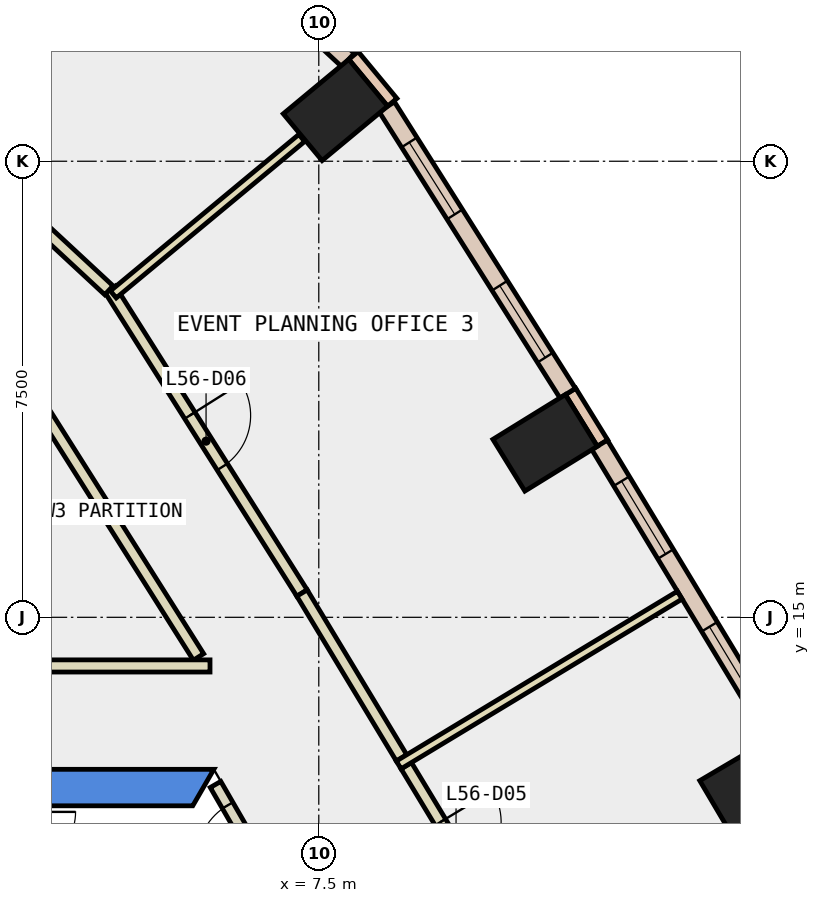
"""IFC4 building model, lengths in metres.
Left out: names, types, materials, properties, quantities, classifications, styles, units other than length and angle.
Written with IfcOpenShell. Run it as: python <this file> out.ifc"""

import sys

from ifc_helpers import new_model, si_unit, direction, frame, frame_2d, origin, origin_2d, place, context, subcontext, project, spatial, polyline, rectangle, outline, extrude, element, fill, save


model = new_model("IFC4")
c1 = context("Model", 3, precision=1e-05, world=origin(), true_north=direction((0.0, 1.0)))
c2 = subcontext(c1, "Body", "Model", "MODEL_VIEW")
j1 = project(units=[si_unit("LENGTHUNIT", "METRE"), si_unit("PLANEANGLEUNIT", "RADIAN")], contexts=[c1])
p1 = place(None, origin())
s1 = spatial("IfcSite", under=j1, at=p1, CompositionType="ELEMENT")
p2 = place(p1, origin())
s2 = spatial("IfcBuilding", under=s1, at=p2, CompositionType="ELEMENT")
p3 = place(p2, frame((0.0, 0.0, 248.6)))
s3 = spatial("IfcBuildingStorey", under=s2, at=p3, CompositionType="ELEMENT", Elevation=248.6)
for number, where, z_axis, x_axis in (
    (1, (14.623, 12.239, -0.34), (0.0, 0.0, 1.0), (-0.509, 0.861, 0.0)),
    (2, (11.222, 17.869, -0.34), (0.0, 0.0, 1.0), (-0.526, 0.851, 0.0)),
    (3, (7.774, 23.343, -0.34), (0.0, 0.0, 1.0), (-0.639, 0.769, 0.0)),
):
    element("IfcColumn", number, at=place(p3, frame(where, z_axis=z_axis, x_axis=x_axis)), inside=s3, PredefinedType="COLUMN", context=c2, shape_type="SweptSolid", body=[
        extrude(rectangle(XDim=1.0, YDim=1.4, at=origin_2d()), origin(), (0.0, 0.0, 1.0), 3.6),
    ])
p4 = place(p3, frame((0.0, 0.0, -0.34)))
e4 = element("IfcWall", 4, at=p4, inside=s3, PredefinedType="SHEAR", context=c2, shape_type="SweptSolid", body=[
    extrude(outline(polyline([(5.774, 12.5), (-5.774, 12.5), (-5.427, 11.9), (5.427, 11.9), (5.774, 12.5)])), origin(), (0.0, 0.0, 1.0), 3.6),
])
p5 = place(p3, frame((12.166, 17.864, 0.0), z_axis=(0.0, 0.0, 1.0), x_axis=(-0.525825307325, 0.850592585306, 0.0)))
e5 = element("IfcWall", 5, at=p5, inside=s3, PredefinedType="STANDARD", context=c2, shape_type="SweptSolid", body=[
    extrude(rectangle(XDim=1.0, YDim=0.2, at=frame_2d((0.5, 0.0))), origin(), (0.0, 0.0, 1.0), 3.26),
])
p6 = place(p3, frame((8.708, 23.469, 0.0), z_axis=(0.0, 0.0, 1.0), x_axis=(-0.637972365578, 0.770059257953, 0.0)))
e6 = element("IfcWall", 6, at=p6, inside=s3, PredefinedType="STANDARD", context=c2, shape_type="SweptSolid", body=[
    extrude(rectangle(XDim=1.0, YDim=0.2, at=frame_2d((0.5, 0.0))), origin(), (0.0, 0.0, 1.0), 3.26),
])
p7 = place(p3, frame((15.011, 13.048, 0.0), z_axis=(0.0, 0.0, 1.0), x_axis=(-0.517169592475, 0.855882943293, 0.0)))
e7 = element("IfcWall", 7, at=p7, inside=s3, PredefinedType="STANDARD", context=c2, shape_type="SweptSolid", body=[
    extrude(rectangle(XDim=5.594, YDim=0.3, at=frame_2d((2.797, 0.0))), origin(), (0.0, 0.0, 1.0), 3.26),
])
p8 = place(p7, frame((0.699, 0.0, 0.9)))
e8 = element("IfcOpeningElement", 8, at=p8, cuts=e7, PredefinedType="OPENING", context=c2, shape_type="SweptSolid", body=[
    extrude(rectangle(XDim=1.4, YDim=2.0, at=frame_2d((0.7, 1.0))), frame((0.0, 0.16, 0.0), z_axis=(0.0, -1.0, 0.0), x_axis=(1.0, 0.0, 0.0)), (0.0, 0.0, 1.0), 0.32),
])
p9 = place(p7, frame((3.496, 0.0, 0.9)))
e9 = element("IfcOpeningElement", 9, at=p9, cuts=e7, PredefinedType="OPENING", context=c2, shape_type="SweptSolid", body=[
    extrude(rectangle(XDim=1.4, YDim=2.0, at=frame_2d((0.7, 1.0))), frame((0.0, 0.16, 0.0), z_axis=(0.0, -1.0, 0.0), x_axis=(1.0, 0.0, 0.0)), (0.0, 0.0, 1.0), 0.32),
])
p10 = place(p3, frame((11.594, 18.685, 0.0), z_axis=(0.0, 0.0, 1.0), x_axis=(-0.534088597203, 0.845428512849, 0.0)))
e10 = element("IfcWall", 10, at=p10, inside=s3, PredefinedType="STANDARD", context=c2, shape_type="SweptSolid", body=[
    extrude(rectangle(XDim=5.572, YDim=0.3, at=frame_2d((2.786, 0.0))), origin(), (0.0, 0.0, 1.0), 3.26),
])
p11 = place(p10, frame((0.693, 0.0, 0.9)))
e11 = element("IfcOpeningElement", 11, at=p11, cuts=e10, PredefinedType="OPENING", context=c2, shape_type="SweptSolid", body=[
    extrude(rectangle(XDim=1.4, YDim=2.0, at=frame_2d((0.7, 1.0))), frame((0.0, 0.16, 0.0), z_axis=(0.0, -1.0, 0.0), x_axis=(1.0, 0.0, 0.0)), (0.0, 0.0, 1.0), 0.32),
])
p12 = place(p10, frame((3.479, 0.0, 0.9)))
e12 = element("IfcOpeningElement", 12, at=p12, cuts=e10, PredefinedType="OPENING", context=c2, shape_type="SweptSolid", body=[
    extrude(rectangle(XDim=1.4, YDim=2.0, at=frame_2d((0.7, 1.0))), frame((0.0, 0.16, 0.0), z_axis=(0.0, -1.0, 0.0), x_axis=(1.0, 0.0, 0.0)), (0.0, 0.0, 1.0), 0.32),
])
p13 = place(p3, frame((7.981, 24.164, 0.0), z_axis=(0.0, 0.0, 1.0), x_axis=(-0.733038780179, 0.680186846942, 0.0)))
e13 = element("IfcWall", 13, at=p13, inside=s3, PredefinedType="STANDARD", context=c2, shape_type="SweptSolid", body=[
    extrude(rectangle(XDim=3.899, YDim=0.3, at=frame_2d((1.949, 0.0))), origin(), (0.0, 0.0, 1.0), 3.26),
])
p14 = place(p13, frame((1.249, 0.0, 0.9)))
e14 = element("IfcOpeningElement", 14, at=p14, cuts=e13, PredefinedType="OPENING", context=c2, shape_type="SweptSolid", body=[
    extrude(rectangle(XDim=1.4, YDim=2.0, at=frame_2d((0.7, 1.0))), frame((0.0, 0.16, 0.0), z_axis=(0.0, -1.0, 0.0), x_axis=(1.0, 0.0, 0.0)), (0.0, 0.0, 1.0), 0.32),
])
p15 = place(p3, frame((5.522, 14.348, 0.0), z_axis=(0.0, 0.0, 1.0), x_axis=(-0.534090914267, 0.845427049069, 0.0)))
e15 = element("IfcWall", 15, at=p15, inside=s3, PredefinedType="PARTITIONING", context=c2, shape_type="SweptSolid", body=[
    extrude(rectangle(XDim=5.628, YDim=0.2, at=frame_2d((2.814, 0.0))), origin(), (0.0, 0.0, 1.0), 3.26),
])
p16 = place(p3, frame((8.939, 12.559, 0.0), z_axis=(0.0, 0.0, 1.0), x_axis=(0.517045022441, -0.855958202699, 0.0)))
e16 = element("IfcWall", 16, at=p16, inside=s3, PredefinedType="PARTITIONING", context=c2, shape_type="SweptSolid", body=[
    extrude(rectangle(XDim=3.166, YDim=0.2, at=frame_2d((1.583, 0.0))), origin(), (0.0, 0.0, 1.0), 3.26),
])
p17 = place(p16, frame((1.083, 0.0, 0.0)))
e17 = element("IfcOpeningElement", 17, at=p17, cuts=e16, PredefinedType="OPENING", context=c2, shape_type="SweptSolid", body=[
    extrude(rectangle(XDim=1.0, YDim=2.1, at=frame_2d((0.5, 1.05))), frame((0.0, 0.11, 0.0), z_axis=(0.0, -1.0, 0.0), x_axis=(1.0, 0.0, 0.0)), (0.0, 0.0, 1.0), 0.22),
])
p18 = place(p3, frame((4.068, 20.395, 0.0), z_axis=(0.0, 0.0, 1.0), x_axis=(0.534062936615, -0.845444723051, 0.0)))
e18 = element("IfcWall", 18, at=p18, inside=s3, PredefinedType="PARTITIONING", context=c2, shape_type="SweptSolid", body=[
    extrude(rectangle(XDim=5.909, YDim=0.2, at=frame_2d((2.955, 0.0))), origin(), (0.0, 0.0, 1.0), 3.26),
])
p19 = place(p18, frame((2.455, 0.0, 0.0)))
e19 = element("IfcOpeningElement", 19, at=p19, cuts=e18, PredefinedType="OPENING", context=c2, shape_type="SweptSolid", body=[
    extrude(rectangle(XDim=1.0, YDim=2.1, at=frame_2d((0.5, 1.05))), frame((0.0, 0.11, 0.0), z_axis=(0.0, -1.0, 0.0), x_axis=(1.0, 0.0, 0.0)), (0.0, 0.0, 1.0), 0.22),
])
p20 = place(p3, frame((7.224, 15.399, 0.0), z_axis=(0.0, 0.0, 1.0), x_axis=(0.51690854001, -0.856040630615, 0.0)))
e20 = element("IfcWall", 20, at=p20, inside=s3, PredefinedType="PARTITIONING", context=c2, shape_type="SweptSolid", body=[
    extrude(rectangle(XDim=3.167, YDim=0.2, at=frame_2d((1.583, 0.0))), origin(), (0.0, 0.0, 1.0), 3.26),
])
p21 = place(p3, frame((1.983, 22.295, 0.0), z_axis=(0.0, 0.0, 1.0), x_axis=(0.732913830966, -0.680321480169, 0.0)))
e21 = element("IfcWall", 21, at=p21, inside=s3, PredefinedType="PARTITIONING", context=c2, shape_type="SweptSolid", body=[
    extrude(rectangle(XDim=2.818, YDim=0.2, at=frame_2d((1.409, 0.0))), origin(), (0.0, 0.0, 1.0), 3.26),
])
p22 = place(p3, frame((8.814, 12.572, 0.0), z_axis=(0.0, 0.0, 1.0), x_axis=(0.855957229262, 0.517046633945, 0.0)))
e22 = element("IfcWall", 22, at=p22, inside=s3, PredefinedType="PARTITIONING", context=c2, shape_type="SweptSolid", body=[
    extrude(rectangle(XDim=5.4, YDim=0.15, at=frame_2d((2.7, 0.0))), origin(), (0.0, 0.0, 1.0), 3.26),
])
p23 = place(p3, frame((4.121, 20.31, 0.0), z_axis=(0.0, 0.0, 1.0), x_axis=(0.769367727798, 0.638806151679, 0.0)))
e23 = element("IfcWall", 23, at=p23, inside=s3, PredefinedType="PARTITIONING", context=c2, shape_type="SweptSolid", body=[
    extrude(rectangle(XDim=4.028, YDim=0.15, at=frame_2d((2.014, 0.0))), origin(), (0.0, 0.0, 1.0), 3.26),
])
p24 = place(p3, frame((6.699, 10.697, 0.0), z_axis=(0.0, 0.0, 1.0), x_axis=(-0.499914839587, 0.866074565589, 0.0)))
e24 = element("IfcWall", 24, at=p24, inside=s3, PredefinedType="PARTITIONING", context=c2, shape_type="SweptSolid", body=[
    extrude(rectangle(XDim=1.794, YDim=0.2, at=frame_2d((0.897, 0.0))), origin(), (0.0, 0.0, 1.0), 2.4),
])
p25 = place(p24, frame((0.397, 0.0, 0.0)))
e25 = element("IfcOpeningElement", 25, at=p25, cuts=e24, PredefinedType="OPENING", context=c2, shape_type="SweptSolid", body=[
    extrude(rectangle(XDim=1.0, YDim=2.1, at=frame_2d((0.5, 1.05))), frame((0.0, 0.11, 0.0), z_axis=(0.0, -1.0, 0.0), x_axis=(1.0, 0.0, 0.0)), (0.0, 0.0, 1.0), 0.22),
])
p26 = place(p3, frame((0.4, 14.2, 0.0), z_axis=(0.0, 0.0, 1.0), x_axis=(1.0, 0.0, 0.0)))
e26 = element("IfcWall", 26, at=p26, inside=s3, PredefinedType="PARTITIONING", context=c2, shape_type="SweptSolid", body=[
    extrude(rectangle(XDim=5.311, YDim=0.2, at=frame_2d((2.656, 0.0))), origin(), (0.0, 0.0, 1.0), 3.26),
])
p27 = place(p26, frame((0.827, 0.0, 0.0)))
e27 = element("IfcOpeningElement", 27, at=p27, cuts=e26, PredefinedType="OPENING", context=c2, shape_type="SweptSolid", body=[
    extrude(rectangle(XDim=1.8, YDim=2.1, at=frame_2d((0.9, 1.05))), frame((0.0, 0.11, 0.0), z_axis=(0.0, -1.0, 0.0), x_axis=(1.0, 0.0, 0.0)), (0.0, 0.0, 1.0), 0.22),
])
p28 = place(p8, origin())
e28 = element("IfcWindow", 28, at=p28, inside=s3, PartitioningType="SINGLE_PANEL", PredefinedType="WINDOW", context=c2, shape_type="SweptSolid", body=[
    extrude(rectangle(XDim=1.4, YDim=2.0, at=frame_2d((0.7, 1.0))), frame((0.0, 0.03, 0.0), z_axis=(0.0, -1.0, 0.0), x_axis=(1.0, 0.0, 0.0)), (0.0, 0.0, 1.0), 0.06),
])
fill(e8, e28)
p29 = place(p9, origin())
e29 = element("IfcWindow", 29, at=p29, inside=s3, PartitioningType="SINGLE_PANEL", PredefinedType="WINDOW", context=c2, shape_type="SweptSolid", body=[
    extrude(rectangle(XDim=1.4, YDim=2.0, at=frame_2d((0.7, 1.0))), frame((0.0, 0.03, 0.0), z_axis=(0.0, -1.0, 0.0), x_axis=(1.0, 0.0, 0.0)), (0.0, 0.0, 1.0), 0.06),
])
fill(e9, e29)
p30 = place(p11, origin())
e30 = element("IfcWindow", 30, at=p30, inside=s3, PartitioningType="SINGLE_PANEL", PredefinedType="WINDOW", context=c2, shape_type="SweptSolid", body=[
    extrude(rectangle(XDim=1.4, YDim=2.0, at=frame_2d((0.7, 1.0))), frame((0.0, 0.03, 0.0), z_axis=(0.0, -1.0, 0.0), x_axis=(1.0, 0.0, 0.0)), (0.0, 0.0, 1.0), 0.06),
])
fill(e11, e30)
p31 = place(p12, origin())
e31 = element("IfcWindow", 31, at=p31, inside=s3, PartitioningType="SINGLE_PANEL", PredefinedType="WINDOW", context=c2, shape_type="SweptSolid", body=[
    extrude(rectangle(XDim=1.4, YDim=2.0, at=frame_2d((0.7, 1.0))), frame((0.0, 0.03, 0.0), z_axis=(0.0, -1.0, 0.0), x_axis=(1.0, 0.0, 0.0)), (0.0, 0.0, 1.0), 0.06),
])
fill(e12, e31)
p32 = place(p17, origin())
e32 = element("IfcDoor", 32, at=p32, inside=s3, OperationType="SINGLE_SWING_LEFT", PredefinedType="DOOR", context=c2, shape_type="SweptSolid", body=[
    extrude(rectangle(XDim=1.0, YDim=2.1, at=frame_2d((0.5, 1.05))), frame((0.0, 0.025, 0.0), z_axis=(0.0, -1.0, 0.0), x_axis=(1.0, 0.0, 0.0)), (0.0, 0.0, 1.0), 0.05),
])
fill(e17, e32)
p33 = place(p19, origin())
e33 = element("IfcDoor", 33, at=p33, inside=s3, OperationType="SINGLE_SWING_LEFT", PredefinedType="DOOR", context=c2, shape_type="SweptSolid", body=[
    extrude(rectangle(XDim=1.0, YDim=2.1, at=frame_2d((0.5, 1.05))), frame((0.0, 0.025, 0.0), z_axis=(0.0, -1.0, 0.0), x_axis=(1.0, 0.0, 0.0)), (0.0, 0.0, 1.0), 0.05),
])
fill(e19, e33)
p34 = place(p25, origin())
e34 = element("IfcDoor", 34, at=p34, inside=s3, OperationType="SINGLE_SWING_LEFT", PredefinedType="DOOR", context=c2, shape_type="SweptSolid", body=[
    extrude(rectangle(XDim=1.0, YDim=2.1, at=frame_2d((0.5, 1.05))), frame((0.0, 0.025, 0.0), z_axis=(0.0, -1.0, 0.0), x_axis=(1.0, 0.0, 0.0)), (0.0, 0.0, 1.0), 0.05),
])
fill(e25, e34)
save(model, sys.argv[1])
